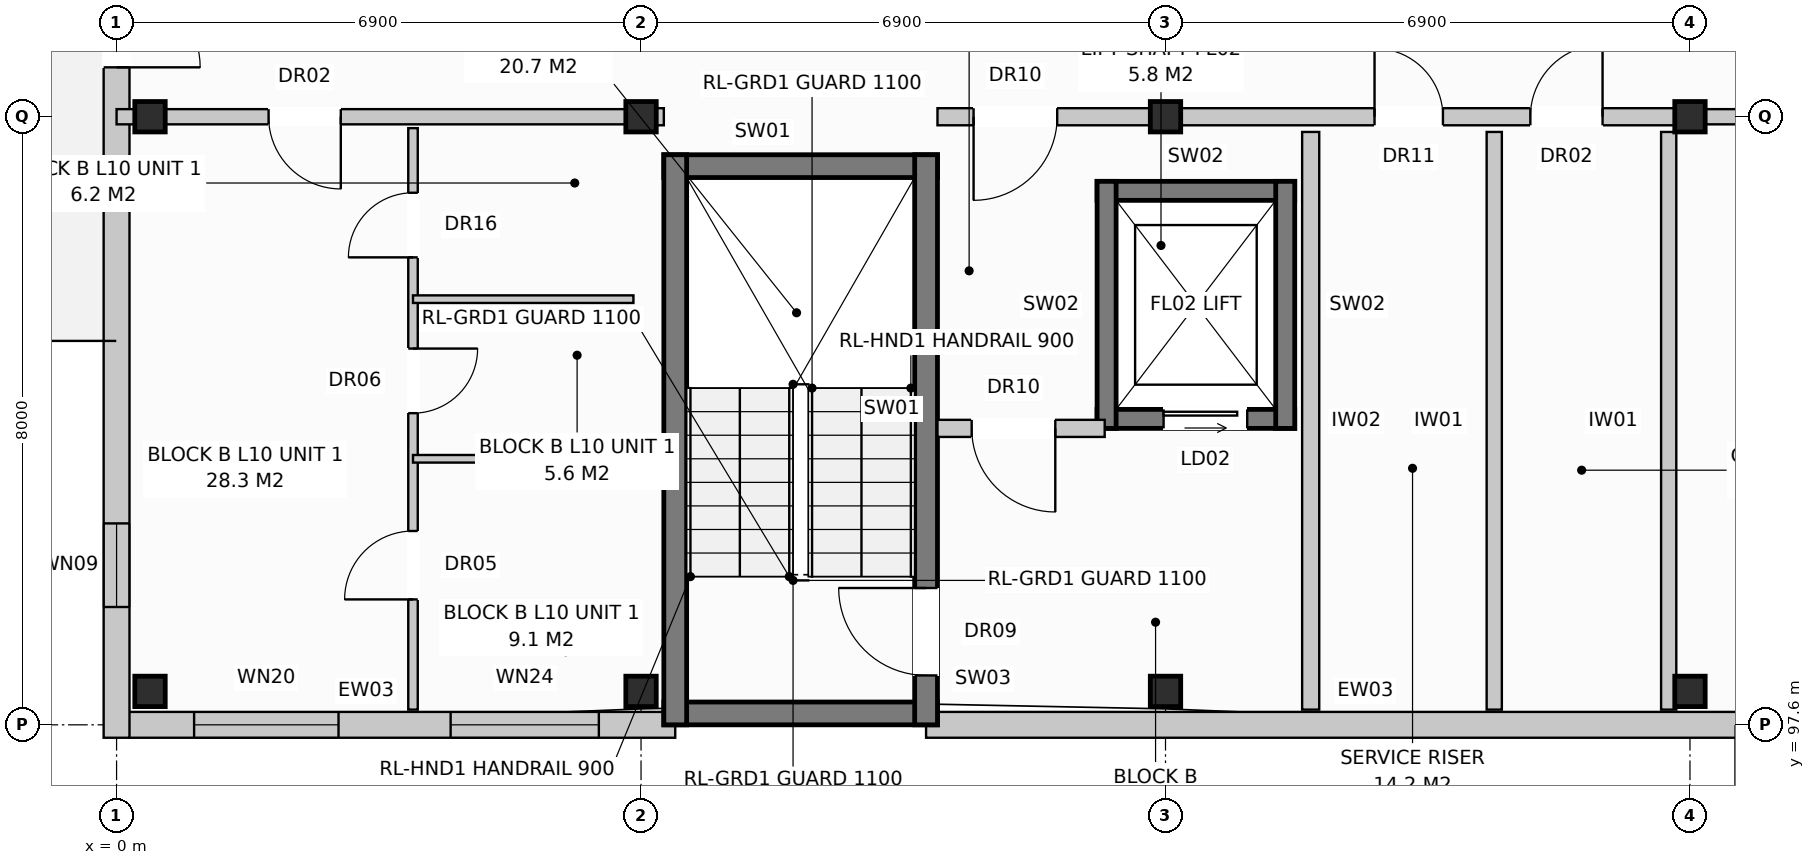
"""IFC4 building model, lengths in metres.
Left out: names, types, materials, properties, quantities, classifications, styles, units other than length and angle.
Written with IfcOpenShell. Run it as: python <this file> out.ifc"""

import sys

from ifc_helpers import new_model, si_unit, direction, frame, frame_2d, origin, origin_with_axes, origin_2d, place, context, subcontext, project, spatial, rectangle, extrude, element, fill, save


model = new_model("IFC4")
c1 = context("Model", 3, precision=1e-05, world=origin(), true_north=direction((0.0, 1.0)))
c2 = subcontext(c1, "Body", "Model", "MODEL_VIEW")
j1 = project(units=[si_unit("LENGTHUNIT", "METRE"), si_unit("PLANEANGLEUNIT", "RADIAN")], contexts=[c1])
p1 = place(None, origin())
s1 = spatial("IfcSite", under=j1, at=p1, CompositionType="ELEMENT")
p2 = place(p1, origin())
s2 = spatial("IfcBuilding", under=s1, at=p2, CompositionType="ELEMENT")
p3 = place(p2, frame((0.0, 0.0, 33.6)))
s3 = spatial("IfcBuildingStorey", under=s2, at=p3, CompositionType="ELEMENT", Elevation=33.6)
for number, where, z_axis, x_axis in (
    (1, (0.44, 98.04, 0.0), (0.0, 0.0, 1.0), (1.0, 0.0, 0.0)),
    (2, (0.44, 105.6, 0.0), (0.0, 0.0, 1.0), (1.0, 0.0, 0.0)),
    (3, (6.9, 98.04, 0.0), (0.0, 0.0, 1.0), (1.0, 0.0, 0.0)),
    (4, (6.9, 105.6, 0.0), (0.0, 0.0, 1.0), (1.0, 0.0, 0.0)),
    (5, (13.8, 98.04, 0.0), (0.0, 0.0, 1.0), (1.0, 0.0, 0.0)),
    (6, (13.8, 105.6, 0.0), (0.0, 0.0, 1.0), (1.0, 0.0, 0.0)),
    (7, (20.7, 98.04, 0.0), (0.0, 0.0, 1.0), (1.0, 0.0, 0.0)),
    (8, (20.7, 105.6, 0.0), (0.0, 0.0, 1.0), (1.0, 0.0, 0.0)),
):
    element("IfcColumn", number, at=place(p3, frame(where, z_axis=z_axis, x_axis=x_axis)), inside=s3, PredefinedType="COLUMN", context=c2, shape_type="SweptSolid", body=[
        extrude(rectangle(XDim=0.4, YDim=0.4, at=origin_2d()), origin(), (0.0, 0.0, 1.0), 3.2),
    ])
p4 = place(p3, frame((0.16, 97.6, 0.0), z_axis=(0.0, 0.0, 1.0), x_axis=(1.0, 0.0, 0.0)))
e9 = element("IfcWall", 9, at=p4, inside=s3, PredefinedType="STANDARD", context=c2, shape_type="SweptSolid", body=[
    extrude(rectangle(XDim=7.19, YDim=0.34, at=frame_2d((3.595, 0.0))), origin(), (0.0, 0.0, 1.0), 2.96),
])
p5 = place(p4, frame((0.86, 0.0, 0.8)))
e10 = element("IfcOpeningElement", 10, at=p5, cuts=e9, PredefinedType="OPENING", context=c2, shape_type="SweptSolid", body=[
    extrude(rectangle(XDim=1.9, YDim=1.85, at=frame_2d((0.95, 0.925))), frame((0.0, 0.182, 0.0), z_axis=(0.0, -1.0, 0.0), x_axis=(1.0, 0.0, 0.0)), (0.0, 0.0, 1.0), 0.364),
])
p6 = place(p4, frame((4.235, 0.0, 0.8)))
e11 = element("IfcOpeningElement", 11, at=p6, cuts=e9, PredefinedType="OPENING", context=c2, shape_type="SweptSolid", body=[
    extrude(rectangle(XDim=1.95, YDim=1.65, at=frame_2d((0.975, 0.825))), frame((0.0, 0.182, 0.0), z_axis=(0.0, -1.0, 0.0), x_axis=(1.0, 0.0, 0.0)), (0.0, 0.0, 1.0), 0.364),
])
p7 = place(p3, frame((10.65, 97.6, 0.0), z_axis=(0.0, 0.0, 1.0), x_axis=(1.0, 0.0, 0.0)))
e12 = element("IfcWall", 12, at=p7, inside=s3, PredefinedType="STANDARD", context=c2, shape_type="SweptSolid", body=[
    extrude(rectangle(XDim=17.4, YDim=0.34, at=frame_2d((8.7, 0.0))), origin(), (0.0, 0.0, 1.0), 2.96),
])
p8 = place(p7, frame((11.87, 0.0, 0.0)))
e13 = element("IfcOpeningElement", 13, at=p8, cuts=e12, PredefinedType="OPENING", context=c2, shape_type="SweptSolid", body=[
    extrude(rectangle(XDim=0.95, YDim=2.1, at=frame_2d((0.475, 1.05))), frame((0.0, 0.182, 0.0), z_axis=(0.0, -1.0, 0.0), x_axis=(1.0, 0.0, 0.0)), (0.0, 0.0, 1.0), 0.364),
])
p9 = place(p7, frame((14.87, 0.0, 0.72)))
e14 = element("IfcOpeningElement", 14, at=p9, cuts=e12, PredefinedType="OPENING", context=c2, shape_type="SweptSolid", body=[
    extrude(rectangle(XDim=1.1, YDim=1.5, at=frame_2d((0.55, 0.75))), frame((0.0, 0.182, 0.0), z_axis=(0.0, -1.0, 0.0), x_axis=(1.0, 0.0, 0.0)), (0.0, 0.0, 1.0), 0.364),
])
p10 = place(p3, frame((0.0, 97.43, 0.0), z_axis=(0.0, 0.0, 1.0), x_axis=(0.0, 1.0, 0.0)))
e15 = element("IfcWall", 15, at=p10, inside=s3, PredefinedType="STANDARD", context=c2, shape_type="SweptSolid", body=[
    extrude(rectangle(XDim=18.74, YDim=0.34, at=frame_2d((9.37, 0.0))), origin(), (0.0, 0.0, 1.0), 2.96),
])
p11 = place(p10, frame((8.82, 0.0, 0.0)))
e16 = element("IfcOpeningElement", 16, at=p11, cuts=e15, PredefinedType="OPENING", context=c2, shape_type="SweptSolid", body=[
    extrude(rectangle(XDim=1.1, YDim=2.1, at=frame_2d((0.55, 1.05))), frame((0.0, 0.182, 0.0), z_axis=(0.0, -1.0, 0.0), x_axis=(1.0, 0.0, 0.0)), (0.0, 0.0, 1.0), 0.364),
])
p12 = place(p10, frame((1.72, 0.0, 0.72)))
e17 = element("IfcOpeningElement", 17, at=p12, cuts=e15, PredefinedType="OPENING", context=c2, shape_type="SweptSolid", body=[
    extrude(rectangle(XDim=1.1, YDim=1.5, at=frame_2d((0.55, 0.75))), frame((0.0, 0.182, 0.0), z_axis=(0.0, -1.0, 0.0), x_axis=(1.0, 0.0, 0.0)), (0.0, 0.0, 1.0), 0.364),
])
p13 = place(p10, frame((15.92, 0.0, 0.72)))
e18 = element("IfcOpeningElement", 18, at=p13, cuts=e15, PredefinedType="OPENING", context=c2, shape_type="SweptSolid", body=[
    extrude(rectangle(XDim=1.1, YDim=1.5, at=frame_2d((0.55, 0.75))), frame((0.0, 0.182, 0.0), z_axis=(0.0, -1.0, 0.0), x_axis=(1.0, 0.0, 0.0)), (0.0, 0.0, 1.0), 0.364),
])
for number, where, z_axis, x_axis in (
    (19, (7.2, 97.75, 0.0), (0.0, 0.0, 1.0), (1.0, 0.0, 0.0)),
    (20, (7.2, 104.95, 0.0), (0.0, 0.0, 1.0), (1.0, 0.0, 0.0)),
):
    element("IfcWall", number, at=place(p3, frame(where, z_axis=z_axis, x_axis=x_axis)), inside=s3, PredefinedType="SHEAR", context=c2, shape_type="SweptSolid", body=[
        extrude(rectangle(XDim=3.6, YDim=0.3, at=frame_2d((1.8, 0.0))), origin(), (0.0, 0.0, 1.0), 2.96),
    ])
p14 = place(p3, frame((7.35, 97.6, 0.0), z_axis=(0.0, 0.0, 1.0), x_axis=(0.0, 1.0, 0.0)))
e21 = element("IfcWall", 21, at=p14, inside=s3, PredefinedType="SHEAR", context=c2, shape_type="SweptSolid", body=[
    extrude(rectangle(XDim=7.5, YDim=0.3, at=frame_2d((3.75, 0.0))), origin(), (0.0, 0.0, 1.0), 2.96),
])
p15 = place(p3, frame((10.65, 97.6, 0.0), z_axis=(0.0, 0.0, 1.0), x_axis=(0.0, 1.0, 0.0)))
e22 = element("IfcWall", 22, at=p15, inside=s3, PredefinedType="SHEAR", context=c2, shape_type="SweptSolid", body=[
    extrude(rectangle(XDim=7.5, YDim=0.3, at=frame_2d((3.75, 0.0))), origin(), (0.0, 0.0, 1.0), 2.96),
])
p16 = place(p15, frame((0.65, 0.0, 0.0)))
e23 = element("IfcOpeningElement", 23, at=p16, cuts=e22, PredefinedType="OPENING", context=c2, shape_type="SweptSolid", body=[
    extrude(rectangle(XDim=1.15, YDim=2.15, at=frame_2d((0.575, 1.075))), frame((0.0, 0.162, 0.0), z_axis=(0.0, -1.0, 0.0), x_axis=(1.0, 0.0, 0.0)), (0.0, 0.0, 1.0), 0.324),
])
p17 = place(p3, frame((12.9, 101.625, 0.0), z_axis=(0.0, 0.0, 1.0), x_axis=(1.0, 0.0, 0.0)))
e24 = element("IfcWall", 24, at=p17, inside=s3, PredefinedType="SHEAR", context=c2, shape_type="SweptSolid", body=[
    extrude(rectangle(XDim=2.6, YDim=0.25, at=frame_2d((1.3, 0.0))), origin(), (0.0, 0.0, 1.0), 2.96),
])
p18 = place(p17, frame((0.875, 0.0, 0.0)))
e25 = element("IfcOpeningElement", 25, at=p18, cuts=e24, PredefinedType="OPENING", context=c2, shape_type="SweptSolid", body=[
    extrude(rectangle(XDim=1.1, YDim=2.1, at=frame_2d((0.55, 1.05))), frame((0.0, 0.137, 0.0), z_axis=(0.0, -1.0, 0.0), x_axis=(1.0, 0.0, 0.0)), (0.0, 0.0, 1.0), 0.274),
])
p19 = place(p3, frame((12.9, 104.625, 0.0), z_axis=(0.0, 0.0, 1.0), x_axis=(1.0, 0.0, 0.0)))
e26 = element("IfcWall", 26, at=p19, inside=s3, PredefinedType="SHEAR", context=c2, shape_type="SweptSolid", body=[
    extrude(rectangle(XDim=2.6, YDim=0.25, at=frame_2d((1.3, 0.0))), origin(), (0.0, 0.0, 1.0), 2.96),
])
for number, where, z_axis, x_axis in (
    (27, (13.025, 101.5, 0.0), (0.0, 0.0, 1.0), (0.0, 1.0, 0.0)),
    (28, (15.375, 101.5, 0.0), (0.0, 0.0, 1.0), (0.0, 1.0, 0.0)),
):
    element("IfcWall", number, at=place(p3, frame(where, z_axis=z_axis, x_axis=x_axis)), inside=s3, PredefinedType="SHEAR", context=c2, shape_type="SweptSolid", body=[
        extrude(rectangle(XDim=3.25, YDim=0.25, at=frame_2d((1.625, 0.0))), origin(), (0.0, 0.0, 1.0), 2.96),
    ])
p20 = place(p3, frame((15.71, 97.8, 0.0), z_axis=(0.0, 0.0, 1.0), x_axis=(0.0, 1.0, 0.0)))
e29 = element("IfcWall", 29, at=p20, inside=s3, PredefinedType="PARTITIONING", context=c2, shape_type="SweptSolid", body=[
    extrude(rectangle(XDim=7.6, YDim=0.225, at=frame_2d((3.8, 0.0))), origin(), (0.0, 0.0, 1.0), 2.59),
])
p21 = place(p3, frame((10.8, 101.5, 0.0), z_axis=(0.0, 0.0, 1.0), x_axis=(1.0, 0.0, 0.0)))
e30 = element("IfcWall", 30, at=p21, inside=s3, PredefinedType="PARTITIONING", context=c2, shape_type="SweptSolid", body=[
    extrude(rectangle(XDim=2.2, YDim=0.225, at=frame_2d((1.1, 0.0))), origin(), (0.0, 0.0, 1.0), 2.96),
])
p22 = place(p21, frame((0.45, 0.0, 0.0)))
e31 = element("IfcOpeningElement", 31, at=p22, cuts=e30, PredefinedType="OPENING", context=c2, shape_type="SweptSolid", body=[
    extrude(rectangle(XDim=1.1, YDim=2.15, at=frame_2d((0.55, 1.075))), frame((0.0, 0.125, 0.0), z_axis=(0.0, -1.0, 0.0), x_axis=(1.0, 0.0, 0.0)), (0.0, 0.0, 1.0), 0.249),
])
p23 = place(p3, frame((6.9, 105.6, 0.0), z_axis=(0.0, 0.0, 1.0), x_axis=(1.0, 0.0, 0.0)))
e32 = element("IfcWall", 32, at=p23, inside=s3, PredefinedType="PARTITIONING", context=c2, shape_type="SweptSolid", body=[
    extrude(rectangle(XDim=0.3, YDim=0.225, at=frame_2d((0.15, 0.0))), origin(), (0.0, 0.0, 1.0), 2.96),
])
for number, where, z_axis, x_axis in (
    (33, (18.125, 97.8, 0.0), (0.0, 0.0, 1.0), (0.0, 1.0, 0.0)),
    (34, (20.42, 97.8, 0.0), (0.0, 0.0, 1.0), (0.0, 1.0, 0.0)),
):
    element("IfcWall", number, at=place(p3, frame(where, z_axis=z_axis, x_axis=x_axis)), inside=s3, PredefinedType="PARTITIONING", context=c2, shape_type="SweptSolid", body=[
        extrude(rectangle(XDim=7.6, YDim=0.2, at=frame_2d((3.8, 0.0))), origin(), (0.0, 0.0, 1.0), 2.96),
    ])
p24 = place(p3, frame((10.8, 105.6, 0.0), z_axis=(0.0, 0.0, 1.0), x_axis=(1.0, 0.0, 0.0)))
e35 = element("IfcWall", 35, at=p24, inside=s3, PredefinedType="PARTITIONING", context=c2, shape_type="SweptSolid", body=[
    extrude(rectangle(XDim=9.9, YDim=0.225, at=frame_2d((4.95, 0.0))), origin(), (0.0, 0.0, 1.0), 2.4),
])
p25 = place(p24, frame((0.475, 0.0, 0.0)))
e36 = element("IfcOpeningElement", 36, at=p25, cuts=e35, PredefinedType="OPENING", context=c2, shape_type="SweptSolid", body=[
    extrude(rectangle(XDim=1.1, YDim=2.15, at=frame_2d((0.55, 1.075))), frame((0.0, 0.125, 0.0), z_axis=(0.0, -1.0, 0.0), x_axis=(1.0, 0.0, 0.0)), (0.0, 0.0, 1.0), 0.249),
])
p26 = place(p24, frame((5.75, 0.0, 0.0)))
e37 = element("IfcOpeningElement", 37, at=p26, cuts=e35, PredefinedType="OPENING", context=c2, shape_type="SweptSolid", body=[
    extrude(rectangle(XDim=0.9, YDim=2.1, at=frame_2d((0.45, 1.05))), frame((0.0, 0.125, 0.0), z_axis=(0.0, -1.0, 0.0), x_axis=(1.0, 0.0, 0.0)), (0.0, 0.0, 1.0), 0.249),
])
p27 = place(p24, frame((7.8, 0.0, 0.0)))
e38 = element("IfcOpeningElement", 38, at=p27, cuts=e35, PredefinedType="OPENING", context=c2, shape_type="SweptSolid", body=[
    extrude(rectangle(XDim=0.95, YDim=2.15, at=frame_2d((0.475, 1.075))), frame((0.0, 0.125, 0.0), z_axis=(0.0, -1.0, 0.0), x_axis=(1.0, 0.0, 0.0)), (0.0, 0.0, 1.0), 0.249),
])
p28 = place(p3, frame((0.0, 105.6, 0.0), z_axis=(0.0, 0.0, 1.0), x_axis=(1.0, 0.0, 0.0)))
e39 = element("IfcWall", 39, at=p28, inside=s3, PredefinedType="PARTITIONING", context=c2, shape_type="SweptSolid", body=[
    extrude(rectangle(XDim=6.9, YDim=0.2, at=frame_2d((3.45, 0.0))), origin(), (0.0, 0.0, 1.0), 2.4),
])
p29 = place(p28, frame((2.0, 0.0, 0.0)))
e40 = element("IfcOpeningElement", 40, at=p29, cuts=e39, PredefinedType="OPENING", context=c2, shape_type="SweptSolid", body=[
    extrude(rectangle(XDim=0.95, YDim=2.15, at=frame_2d((0.475, 1.075))), frame((0.0, 0.112, 0.0), z_axis=(0.0, -1.0, 0.0), x_axis=(1.0, 0.0, 0.0)), (0.0, 0.0, 1.0), 0.224),
])
p30 = place(p3, frame((3.9, 105.45, 0.0), z_axis=(0.0, 0.0, 1.0), x_axis=(0.0, -1.0, 0.0)))
e41 = element("IfcWall", 41, at=p30, inside=s3, PredefinedType="PARTITIONING", context=c2, shape_type="SweptSolid", body=[
    extrude(rectangle(XDim=7.65, YDim=0.125, at=frame_2d((3.825, 0.0))), origin(), (0.0, 0.0, 1.0), 2.96),
])
p31 = place(p30, frame((0.85, 0.0, 0.0)))
e42 = element("IfcOpeningElement", 42, at=p31, cuts=e41, PredefinedType="OPENING", context=c2, shape_type="SweptSolid", body=[
    extrude(rectangle(XDim=0.85, YDim=2.1, at=frame_2d((0.425, 1.05))), frame((0.0, 0.074, 0.0), z_axis=(0.0, -1.0, 0.0), x_axis=(1.0, 0.0, 0.0)), (0.0, 0.0, 1.0), 0.149),
])
p32 = place(p30, frame((2.9, 0.0, 0.0)))
e43 = element("IfcOpeningElement", 43, at=p32, cuts=e41, PredefinedType="OPENING", context=c2, shape_type="SweptSolid", body=[
    extrude(rectangle(XDim=0.85, YDim=2.05, at=frame_2d((0.425, 1.025))), frame((0.0, 0.074, 0.0), z_axis=(0.0, -1.0, 0.0), x_axis=(1.0, 0.0, 0.0)), (0.0, 0.0, 1.0), 0.149),
])
p33 = place(p30, frame((5.3, 0.0, 0.0)))
e44 = element("IfcOpeningElement", 44, at=p33, cuts=e41, PredefinedType="OPENING", context=c2, shape_type="SweptSolid", body=[
    extrude(rectangle(XDim=0.9, YDim=2.1, at=frame_2d((0.45, 1.05))), frame((0.0, 0.074, 0.0), z_axis=(0.0, -1.0, 0.0), x_axis=(1.0, 0.0, 0.0)), (0.0, 0.0, 1.0), 0.149),
])
for number, where, z_axis, x_axis in (
    (45, (3.9, 103.2, 0.0), (0.0, 0.0, 1.0), (1.0, 0.0, 0.0)),
    (46, (3.9, 101.1, 0.0), (0.0, 0.0, 1.0), (1.0, 0.0, 0.0)),
):
    element("IfcWall", number, at=place(p3, frame(where, z_axis=z_axis, x_axis=x_axis)), inside=s3, PredefinedType="PARTITIONING", context=c2, shape_type="SweptSolid", body=[
        extrude(rectangle(XDim=2.9, YDim=0.1, at=frame_2d((1.45, 0.0))), origin(), (0.0, 0.0, 1.0), 2.96),
    ])
p34 = place(p3, frame((20.7, 105.6, 0.0), z_axis=(0.0, 0.0, 1.0), x_axis=(1.0, 0.0, 0.0)))
e47 = element("IfcWall", 47, at=p34, inside=s3, PredefinedType="PARTITIONING", context=c2, shape_type="SweptSolid", body=[
    extrude(rectangle(XDim=6.9, YDim=0.2, at=frame_2d((3.45, 0.0))), origin(), (0.0, 0.0, 1.0), 2.4),
])
p35 = place(p34, frame((2.0, 0.0, 0.0)))
e48 = element("IfcOpeningElement", 48, at=p35, cuts=e47, PredefinedType="OPENING", context=c2, shape_type="SweptSolid", body=[
    extrude(rectangle(XDim=0.95, YDim=2.15, at=frame_2d((0.475, 1.075))), frame((0.0, 0.112, 0.0), z_axis=(0.0, -1.0, 0.0), x_axis=(1.0, 0.0, 0.0)), (0.0, 0.0, 1.0), 0.224),
])
p36 = place(p5, origin_with_axes())
e49 = element("IfcWindow", 49, at=p36, inside=s3, PartitioningType="SINGLE_PANEL", PredefinedType="WINDOW", context=c2, shape_type="SweptSolid", body=[
    extrude(rectangle(XDim=1.9, YDim=1.85, at=frame_2d((0.95, 0.925))), frame((0.0, 0.03, 0.0), z_axis=(0.0, -1.0, 0.0), x_axis=(1.0, 0.0, 0.0)), (0.0, 0.0, 1.0), 0.06),
])
fill(e10, e49)
p37 = place(p6, origin_with_axes())
e50 = element("IfcWindow", 50, at=p37, inside=s3, PartitioningType="SINGLE_PANEL", PredefinedType="WINDOW", context=c2, shape_type="SweptSolid", body=[
    extrude(rectangle(XDim=1.95, YDim=1.65, at=frame_2d((0.975, 0.825))), frame((0.0, 0.03, 0.0), z_axis=(0.0, -1.0, 0.0), x_axis=(1.0, 0.0, 0.0)), (0.0, 0.0, 1.0), 0.06),
])
fill(e11, e50)
p38 = place(p11, frame((1.1, 0.0, 0.0), z_axis=(0.0, 0.0, 1.0), x_axis=(-1.0, 0.0, 0.0)))
e51 = element("IfcDoor", 51, at=p38, inside=s3, OperationType="SINGLE_SWING_LEFT", PredefinedType="DOOR", context=c2, shape_type="SweptSolid", body=[
    extrude(rectangle(XDim=1.1, YDim=2.1, at=frame_2d((0.55, 1.05))), frame((0.0, 0.025, 0.0), z_axis=(0.0, -1.0, 0.0), x_axis=(1.0, 0.0, 0.0)), (0.0, 0.0, 1.0), 0.05),
])
fill(e16, e51)
p39 = place(p12, origin_with_axes())
e52 = element("IfcWindow", 52, at=p39, inside=s3, PartitioningType="SINGLE_PANEL", PredefinedType="WINDOW", context=c2, shape_type="SweptSolid", body=[
    extrude(rectangle(XDim=1.1, YDim=1.5, at=frame_2d((0.55, 0.75))), frame((0.0, 0.03, 0.0), z_axis=(0.0, -1.0, 0.0), x_axis=(1.0, 0.0, 0.0)), (0.0, 0.0, 1.0), 0.06),
])
fill(e17, e52)
p40 = place(p16, origin_with_axes())
e53 = element("IfcDoor", 53, at=p40, inside=s3, OperationType="SINGLE_SWING_RIGHT", PredefinedType="DOOR", context=c2, shape_type="SweptSolid", body=[
    extrude(rectangle(XDim=1.15, YDim=2.15, at=frame_2d((0.575, 1.075))), frame((0.0, 0.025, 0.0), z_axis=(0.0, -1.0, 0.0), x_axis=(1.0, 0.0, 0.0)), (0.0, 0.0, 1.0), 0.05),
])
fill(e23, e53)
p41 = place(p18, origin_with_axes())
e54 = element("IfcDoor", 54, at=p41, inside=s3, OperationType="SLIDING_TO_LEFT", PredefinedType="DOOR", context=c2, shape_type="SweptSolid", body=[
    extrude(rectangle(XDim=1.1, YDim=2.1, at=frame_2d((0.55, 1.05))), frame((0.0, 0.025, 0.0), z_axis=(0.0, -1.0, 0.0), x_axis=(1.0, 0.0, 0.0)), (0.0, 0.0, 1.0), 0.05),
])
fill(e25, e54)
p42 = place(p22, frame((1.1, 0.0, 0.0), z_axis=(0.0, 0.0, 1.0), x_axis=(-1.0, 0.0, 0.0)))
e55 = element("IfcDoor", 55, at=p42, inside=s3, OperationType="SINGLE_SWING_RIGHT", PredefinedType="DOOR", context=c2, shape_type="SweptSolid", body=[
    extrude(rectangle(XDim=1.1, YDim=2.15, at=frame_2d((0.55, 1.075))), frame((0.0, 0.025, 0.0), z_axis=(0.0, -1.0, 0.0), x_axis=(1.0, 0.0, 0.0)), (0.0, 0.0, 1.0), 0.05),
])
fill(e31, e55)
p43 = place(p25, frame((1.1, 0.0, 0.0), z_axis=(0.0, 0.0, 1.0), x_axis=(-1.0, 0.0, 0.0)))
e56 = element("IfcDoor", 56, at=p43, inside=s3, OperationType="SINGLE_SWING_LEFT", PredefinedType="DOOR", context=c2, shape_type="SweptSolid", body=[
    extrude(rectangle(XDim=1.1, YDim=2.15, at=frame_2d((0.55, 1.075))), frame((0.0, 0.025, 0.0), z_axis=(0.0, -1.0, 0.0), x_axis=(1.0, 0.0, 0.0)), (0.0, 0.0, 1.0), 0.05),
])
fill(e36, e56)
p44 = place(p26, origin_with_axes())
e57 = element("IfcDoor", 57, at=p44, inside=s3, OperationType="SINGLE_SWING_LEFT", PredefinedType="DOOR", context=c2, shape_type="SweptSolid", body=[
    extrude(rectangle(XDim=0.9, YDim=2.1, at=frame_2d((0.45, 1.05))), frame((0.0, 0.025, 0.0), z_axis=(0.0, -1.0, 0.0), x_axis=(1.0, 0.0, 0.0)), (0.0, 0.0, 1.0), 0.05),
])
fill(e37, e57)
p45 = place(p27, origin_with_axes())
e58 = element("IfcDoor", 58, at=p45, inside=s3, OperationType="SINGLE_SWING_RIGHT", PredefinedType="DOOR", context=c2, shape_type="SweptSolid", body=[
    extrude(rectangle(XDim=0.95, YDim=2.15, at=frame_2d((0.475, 1.075))), frame((0.0, 0.025, 0.0), z_axis=(0.0, -1.0, 0.0), x_axis=(1.0, 0.0, 0.0)), (0.0, 0.0, 1.0), 0.05),
])
fill(e38, e58)
p46 = place(p29, frame((0.95, 0.0, 0.0), z_axis=(0.0, 0.0, 1.0), x_axis=(-1.0, 0.0, 0.0)))
e59 = element("IfcDoor", 59, at=p46, inside=s3, OperationType="SINGLE_SWING_RIGHT", PredefinedType="DOOR", context=c2, shape_type="SweptSolid", body=[
    extrude(rectangle(XDim=0.95, YDim=2.15, at=frame_2d((0.475, 1.075))), frame((0.0, 0.025, 0.0), z_axis=(0.0, -1.0, 0.0), x_axis=(1.0, 0.0, 0.0)), (0.0, 0.0, 1.0), 0.05),
])
fill(e40, e59)
p47 = place(p31, frame((0.85, 0.0, 0.0), z_axis=(0.0, 0.0, 1.0), x_axis=(-1.0, 0.0, 0.0)))
e60 = element("IfcDoor", 60, at=p47, inside=s3, OperationType="SINGLE_SWING_RIGHT", PredefinedType="DOOR", context=c2, shape_type="SweptSolid", body=[
    extrude(rectangle(XDim=0.85, YDim=2.1, at=frame_2d((0.425, 1.05))), frame((0.0, 0.025, 0.0), z_axis=(0.0, -1.0, 0.0), x_axis=(1.0, 0.0, 0.0)), (0.0, 0.0, 1.0), 0.05),
])
fill(e42, e60)
p48 = place(p32, origin_with_axes())
e61 = element("IfcDoor", 61, at=p48, inside=s3, OperationType="SINGLE_SWING_LEFT", PredefinedType="DOOR", context=c2, shape_type="SweptSolid", body=[
    extrude(rectangle(XDim=0.85, YDim=2.05, at=frame_2d((0.425, 1.025))), frame((0.0, 0.025, 0.0), z_axis=(0.0, -1.0, 0.0), x_axis=(1.0, 0.0, 0.0)), (0.0, 0.0, 1.0), 0.05),
])
fill(e43, e61)
p49 = place(p33, frame((0.9, 0.0, 0.0), z_axis=(0.0, 0.0, 1.0), x_axis=(-1.0, 0.0, 0.0)))
e62 = element("IfcDoor", 62, at=p49, inside=s3, OperationType="SINGLE_SWING_RIGHT", PredefinedType="DOOR", context=c2, shape_type="SweptSolid", body=[
    extrude(rectangle(XDim=0.9, YDim=2.1, at=frame_2d((0.45, 1.05))), frame((0.0, 0.025, 0.0), z_axis=(0.0, -1.0, 0.0), x_axis=(1.0, 0.0, 0.0)), (0.0, 0.0, 1.0), 0.05),
])
fill(e44, e62)
save(model, sys.argv[1])
